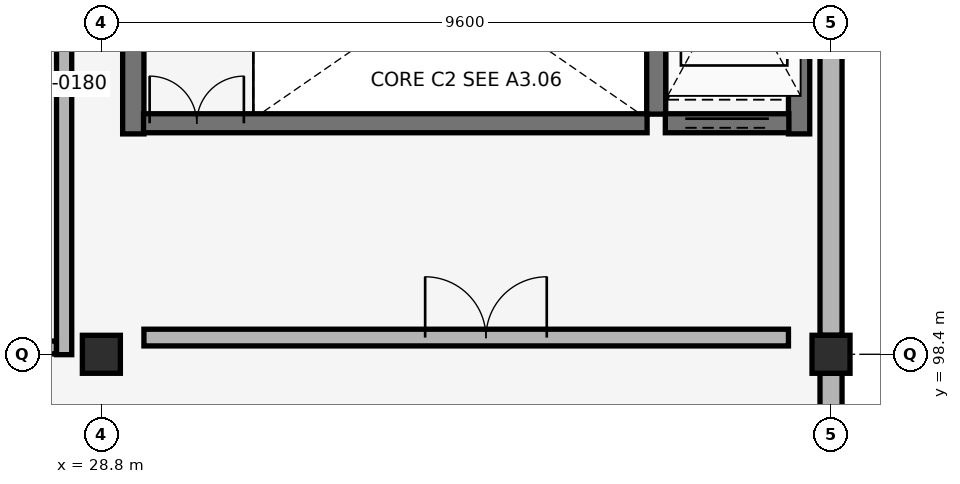
"""IFC4 building model, lengths in metres.
Left out: names, types, materials, properties, quantities, classifications, styles, units other than length and angle.
Written with IfcOpenShell. Run it as: python <this file> out.ifc"""

import sys

from ifc_helpers import new_model, si_unit, direction, frame, frame_2d, origin, origin_2d, place, context, subcontext, project, spatial, rectangle, extrude, element, fill, save


model = new_model("IFC4")
c1 = context("Model", 3, precision=1e-05, world=origin(), true_north=direction((0.0, 1.0)))
c2 = subcontext(c1, "Body", "Model", "MODEL_VIEW")
j1 = project(units=[si_unit("LENGTHUNIT", "METRE"), si_unit("PLANEANGLEUNIT", "RADIAN")], contexts=[c1])
p1 = place(None, origin())
s1 = spatial("IfcSite", under=j1, at=p1, CompositionType="ELEMENT")
p2 = place(p1, origin())
s2 = spatial("IfcBuilding", under=s1, at=p2, CompositionType="ELEMENT")
p3 = place(p2, frame((0.0, 0.0, 20.74)))
s3 = spatial("IfcBuildingStorey", under=s2, at=p3, CompositionType="ELEMENT", Elevation=20.74)
for number, where, z_axis, x_axis in (
    (1, (28.8, 98.4, 0.0), (0.0, 0.0, 1.0), (1.0, 0.0, 0.0)),
    (2, (38.4, 98.4, 0.0), (0.0, 0.0, 1.0), (1.0, 0.0, 0.0)),
):
    element("IfcColumn", number, at=place(p3, frame(where, z_axis=z_axis, x_axis=x_axis)), inside=s3, PredefinedType="COLUMN", context=c2, shape_type="SweptSolid", body=[
        extrude(rectangle(XDim=0.5, YDim=0.5, at=origin_2d()), origin(), (0.0, 0.0, 1.0), 4.08),
    ])
p4 = place(p3, frame((38.4, 91.45, 0.0), z_axis=(0.0, 0.0, 1.0), x_axis=(0.0, 1.0, 0.0)))
e3 = element("IfcWall", 3, at=p4, inside=s3, PredefinedType="SOLIDWALL", context=c2, shape_type="SweptSolid", body=[
    extrude(rectangle(XDim=6.7, YDim=0.29, at=frame_2d((3.35, 0.0))), origin(), (0.0, 0.0, 1.0), 3.07),
])
p5 = place(p4, frame((1.165, 0.0, 0.88)))
e4 = element("IfcOpeningElement", 4, at=p5, cuts=e3, PredefinedType="OPENING", context=c2, shape_type="SweptSolid", body=[
    extrude(rectangle(XDim=1.02, YDim=1.88, at=frame_2d((0.51, 0.94))), frame((0.0, 0.155, 0.0), z_axis=(0.0, -1.0, 0.0), x_axis=(1.0, 0.0, 0.0)), (0.0, 0.0, 1.0), 0.31),
])
p6 = place(p4, frame((2.84, 0.0, 0.88)))
e5 = element("IfcOpeningElement", 5, at=p6, cuts=e3, PredefinedType="OPENING", context=c2, shape_type="SweptSolid", body=[
    extrude(rectangle(XDim=1.02, YDim=1.88, at=frame_2d((0.51, 0.94))), frame((0.0, 0.155, 0.0), z_axis=(0.0, -1.0, 0.0), x_axis=(1.0, 0.0, 0.0)), (0.0, 0.0, 1.0), 0.31),
])
p7 = place(p4, frame((4.515, 0.0, 0.88)))
e6 = element("IfcOpeningElement", 6, at=p7, cuts=e3, PredefinedType="OPENING", context=c2, shape_type="SweptSolid", body=[
    extrude(rectangle(XDim=1.02, YDim=1.88, at=frame_2d((0.51, 0.94))), frame((0.0, 0.155, 0.0), z_axis=(0.0, -1.0, 0.0), x_axis=(1.0, 0.0, 0.0)), (0.0, 0.0, 1.0), 0.31),
])
p8 = place(p3, frame((38.4, 98.65, 0.0), z_axis=(0.0, 0.0, 1.0), x_axis=(0.0, 1.0, 0.0)))
e7 = element("IfcWall", 7, at=p8, inside=s3, PredefinedType="SOLIDWALL", context=c2, shape_type="SweptSolid", body=[
    extrude(rectangle(XDim=6.7, YDim=0.29, at=frame_2d((3.35, 0.0))), origin(), (0.0, 0.0, 1.0), 3.07),
])
for number, where, z_axis, x_axis in (
    (8, (29.22, 101.3, 0.0), (0.0, 0.0, 1.0), (0.0, 1.0, 0.0)),
    (9, (37.98, 101.3, 0.0), (0.0, 0.0, 1.0), (0.0, 1.0, 0.0)),
):
    element("IfcWall", number, at=place(p3, frame(where, z_axis=z_axis, x_axis=x_axis)), inside=s3, PredefinedType="SHEAR", context=c2, shape_type="SweptSolid", body=[
        extrude(rectangle(XDim=4.08, YDim=0.28, at=frame_2d((2.04, 0.0))), origin(), (0.0, 0.0, 1.0), 3.8),
    ])
p9 = place(p3, frame((36.1, 101.56, 0.0), z_axis=(0.0, 0.0, 1.0), x_axis=(0.0, 1.0, 0.0)))
e10 = element("IfcWall", 10, at=p9, inside=s3, PredefinedType="SHEAR", context=c2, shape_type="SweptSolid", body=[
    extrude(rectangle(XDim=3.54, YDim=0.25, at=frame_2d((1.77, 0.0))), origin(), (0.0, 0.0, 1.0), 3.8),
])
p10 = place(p3, frame((29.355, 101.44, 0.0), z_axis=(0.0, 0.0, 1.0), x_axis=(1.0, 0.0, 0.0)))
e11 = element("IfcWall", 11, at=p10, inside=s3, PredefinedType="SHEAR", context=c2, shape_type="SweptSolid", body=[
    extrude(rectangle(XDim=6.625, YDim=0.25, at=frame_2d((3.312, 0.0))), origin(), (0.0, 0.0, 1.0), 3.8),
])
p11 = place(p10, frame((0.08, 0.0, 0.0)))
e12 = element("IfcOpeningElement", 12, at=p11, cuts=e11, PredefinedType="OPENING", context=c2, shape_type="SweptSolid", body=[
    extrude(rectangle(XDim=1.24, YDim=2.15, at=frame_2d((0.62, 1.075))), frame((0.0, 0.135, 0.0), z_axis=(0.0, -1.0, 0.0), x_axis=(1.0, 0.0, 0.0)), (0.0, 0.0, 1.0), 0.27),
])
p12 = place(p3, frame((29.36, 98.62, 0.0), z_axis=(0.0, 0.0, 1.0), x_axis=(1.0, 0.0, 0.0)))
e13 = element("IfcWall", 13, at=p12, inside=s3, PredefinedType="PARTITIONING", context=c2, shape_type="SweptSolid", body=[
    extrude(rectangle(XDim=8.48, YDim=0.22, at=frame_2d((4.24, 0.0))), origin(), (0.0, 0.0, 1.0), 3.17),
])
p13 = place(p12, frame((3.7, 0.0, 0.0)))
e14 = element("IfcOpeningElement", 14, at=p13, cuts=e13, PredefinedType="OPENING", context=c2, shape_type="SweptSolid", body=[
    extrude(rectangle(XDim=1.6, YDim=2.2, at=frame_2d((0.8, 1.1))), frame((0.0, 0.12, 0.0), z_axis=(0.0, -1.0, 0.0), x_axis=(1.0, 0.0, 0.0)), (0.0, 0.0, 1.0), 0.24),
])
p14 = place(p3, frame((36.22, 101.44, 0.0), z_axis=(0.0, 0.0, 1.0), x_axis=(1.0, 0.0, 0.0)))
e15 = element("IfcWall", 15, at=p14, inside=s3, PredefinedType="SHEAR", context=c2, shape_type="SweptSolid", body=[
    extrude(rectangle(XDim=1.625, YDim=0.25, at=frame_2d((0.812, 0.0))), origin(), (0.0, 0.0, 1.0), 3.8),
])
p15 = place(p14, frame((0.262, 0.0, 0.0)))
e16 = element("IfcOpeningElement", 16, at=p15, cuts=e15, PredefinedType="OPENING", context=c2, shape_type="SweptSolid", body=[
    extrude(rectangle(XDim=1.1, YDim=2.15, at=frame_2d((0.55, 1.075))), frame((0.0, 0.135, 0.0), z_axis=(0.0, -1.0, 0.0), x_axis=(1.0, 0.0, 0.0)), (0.0, 0.0, 1.0), 0.27),
])
p16 = place(p3, frame((28.31, 98.395, 0.0), z_axis=(0.0, 0.0, 1.0), x_axis=(0.0, 1.0, 0.0)))
e17 = element("IfcWall", 17, at=p16, inside=s3, PredefinedType="PLUMBINGWALL", context=c2, shape_type="SweptSolid", body=[
    extrude(rectangle(XDim=6.228, YDim=0.2, at=frame_2d((3.114, 0.0))), origin(), (0.0, 0.0, 1.0), 3.12),
])
p17 = place(p3, frame((24.197, 98.49, 0.0), z_axis=(0.0, 0.0, 1.0), x_axis=(1.0, 0.0, 0.0)))
e18 = element("IfcWall", 18, at=p17, inside=s3, PredefinedType="PLUMBINGWALL", context=c2, shape_type="SweptSolid", body=[
    extrude(rectangle(XDim=4.011, YDim=0.17, at=frame_2d((2.005, 0.0))), origin(), (0.0, 0.0, 1.0), 3.12),
])
p18 = place(p17, frame((1.545, 0.0, 0.0)))
e19 = element("IfcOpeningElement", 19, at=p18, cuts=e18, PredefinedType="OPENING", context=c2, shape_type="SweptSolid", body=[
    extrude(rectangle(XDim=0.92, YDim=2.08, at=frame_2d((0.46, 1.04))), frame((0.0, 0.095, 0.0), z_axis=(0.0, -1.0, 0.0), x_axis=(1.0, 0.0, 0.0)), (0.0, 0.0, 1.0), 0.19),
])
p19 = place(p11, origin())
e20 = element("IfcDoor", 20, at=p19, inside=s3, OperationType="DOUBLE_DOOR_SINGLE_SWING", PredefinedType="DOOR", context=c2, shape_type="SweptSolid", body=[
    extrude(rectangle(XDim=1.24, YDim=2.15, at=frame_2d((0.62, 1.075))), frame((0.0, 0.025, 0.0), z_axis=(0.0, -1.0, 0.0), x_axis=(1.0, 0.0, 0.0)), (0.0, 0.0, 1.0), 0.05),
])
fill(e12, e20)
p20 = place(p13, origin())
e21 = element("IfcDoor", 21, at=p20, inside=s3, OperationType="DOUBLE_DOOR_SINGLE_SWING", PredefinedType="DOOR", context=c2, shape_type="SweptSolid", body=[
    extrude(rectangle(XDim=1.6, YDim=2.2, at=frame_2d((0.8, 1.1))), frame((0.0, 0.025, 0.0), z_axis=(0.0, -1.0, 0.0), x_axis=(1.0, 0.0, 0.0)), (0.0, 0.0, 1.0), 0.05),
])
fill(e14, e21)
p21 = place(p15, origin())
e22 = element("IfcDoor", 22, at=p21, inside=s3, OperationType="DOUBLE_DOOR_SLIDING", PredefinedType="DOOR", context=c2, shape_type="SweptSolid", body=[
    extrude(rectangle(XDim=1.1, YDim=2.15, at=frame_2d((0.55, 1.075))), frame((0.0, 0.025, 0.0), z_axis=(0.0, -1.0, 0.0), x_axis=(1.0, 0.0, 0.0)), (0.0, 0.0, 1.0), 0.05),
])
fill(e16, e22)
save(model, sys.argv[1])
